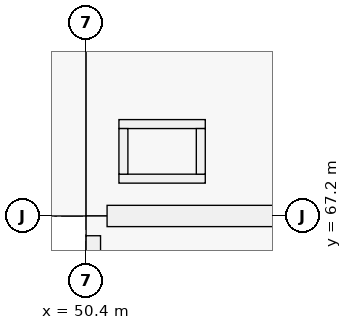
"""IFC4 building model, lengths in metres.
Left out: names, types, materials, properties, quantities, classifications, styles, units other than length and angle.
Written with IfcOpenShell. Run it as: python <this file> out.ifc"""

import sys

from ifc_helpers import new_model, si_unit, direction, frame, frame_2d, origin, origin_2d, place, context, subcontext, project, spatial, rectangle, extrude, element, save


model = new_model("IFC4")
c1 = context("Model", 3, precision=1e-05, world=origin(), true_north=direction((0.0, 1.0)))
c2 = subcontext(c1, "Body", "Model", "MODEL_VIEW")
j1 = project(units=[si_unit("LENGTHUNIT", "METRE"), si_unit("PLANEANGLEUNIT", "RADIAN")], contexts=[c1])
p1 = place(None, origin())
s1 = spatial("IfcSite", under=j1, at=p1, CompositionType="ELEMENT")
p2 = place(p1, origin())
s2 = spatial("IfcBuilding", under=s1, at=p2, CompositionType="ELEMENT")
p3 = place(p2, frame((0.0, 0.0, 19.08)))
s3 = spatial("IfcBuildingStorey", under=s2, at=p3, CompositionType="ELEMENT", Elevation=19.08)
p4 = place(p3, frame((50.4, 67.2, 0.0), z_axis=(0.0, 0.0, 1.0), x_axis=(1.0, 0.0, 0.0)))
e1 = element("IfcColumn", 1, at=p4, inside=s3, PredefinedType="COLUMN", context=c2, shape_type="SweptSolid", body=[
    extrude(rectangle(XDim=0.55, YDim=0.55, at=origin_2d()), origin(), (0.0, 0.0, 1.0), 4.07),
])
p5 = place(p3, frame((58.524, 67.2, 0.0), z_axis=(0.0, 0.0, 1.0), x_axis=(-1.0, 0.0, 0.0)))
e2 = element("IfcWall", 2, at=p5, inside=s3, PredefinedType="SOLIDWALL", context=c2, shape_type="SweptSolid", body=[
    extrude(rectangle(XDim=7.848, YDim=0.28, at=frame_2d((3.924, 0.0))), origin(), (0.0, 0.0, 1.0), 3.37),
])
p6 = place(p5, frame((3.199, 0.0, 0.9)))
e3 = element("IfcOpeningElement", 3, at=p6, cuts=e2, PredefinedType="OPENING", context=c2, shape_type="SweptSolid", body=[
    extrude(rectangle(XDim=1.45, YDim=1.85, at=frame_2d((0.725, 0.925))), frame((0.0, 0.14, 0.0), z_axis=(0.0, -1.0, 0.0), x_axis=(1.0, 0.0, 0.0)), (0.0, 0.0, 1.0), 0.28),
])
p7 = place(p3, frame((50.495, 59.06, 0.0), z_axis=(0.0, 0.0, 1.0), x_axis=(0.0, 1.0, 0.0)))
e4 = element("IfcWall", 4, at=p7, inside=s3, PredefinedType="PARAPET", context=c2, shape_type="SweptSolid", body=[
    extrude(rectangle(XDim=7.88, YDim=0.19, at=frame_2d((3.94, 0.0))), origin(), (0.0, 0.0, 1.0), 0.95),
])
for number, where, z_axis, x_axis in (
    (5, (50.832, 67.691, 0.0), (0.0, 0.0, 1.0), (1.0, 0.0, 0.0)),
    (6, (50.832, 68.409, 0.0), (0.0, 0.0, 1.0), (1.0, 0.0, 0.0)),
):
    element("IfcWall", number, at=place(p3, frame(where, z_axis=z_axis, x_axis=x_axis)), inside=s3, PredefinedType="PARTITIONING", context=c2, shape_type="SweptSolid", body=[
        extrude(rectangle(XDim=1.136, YDim=0.118, at=frame_2d((0.568, 0.0))), origin(), (0.0, 0.0, 1.0), 3.35),
    ])
for number, where, z_axis, x_axis in (
    (7, (50.891, 67.75, 0.0), (0.0, 0.0, 1.0), (0.0, 1.0, 0.0)),
    (8, (51.909, 67.75, 0.0), (0.0, 0.0, 1.0), (0.0, 1.0, 0.0)),
):
    element("IfcWall", number, at=place(p3, frame(where, z_axis=z_axis, x_axis=x_axis)), inside=s3, PredefinedType="PARTITIONING", context=c2, shape_type="SweptSolid", body=[
        extrude(rectangle(XDim=0.6, YDim=0.118, at=frame_2d((0.3, 0.0))), origin(), (0.0, 0.0, 1.0), 3.35),
    ])
save(model, sys.argv[1])
